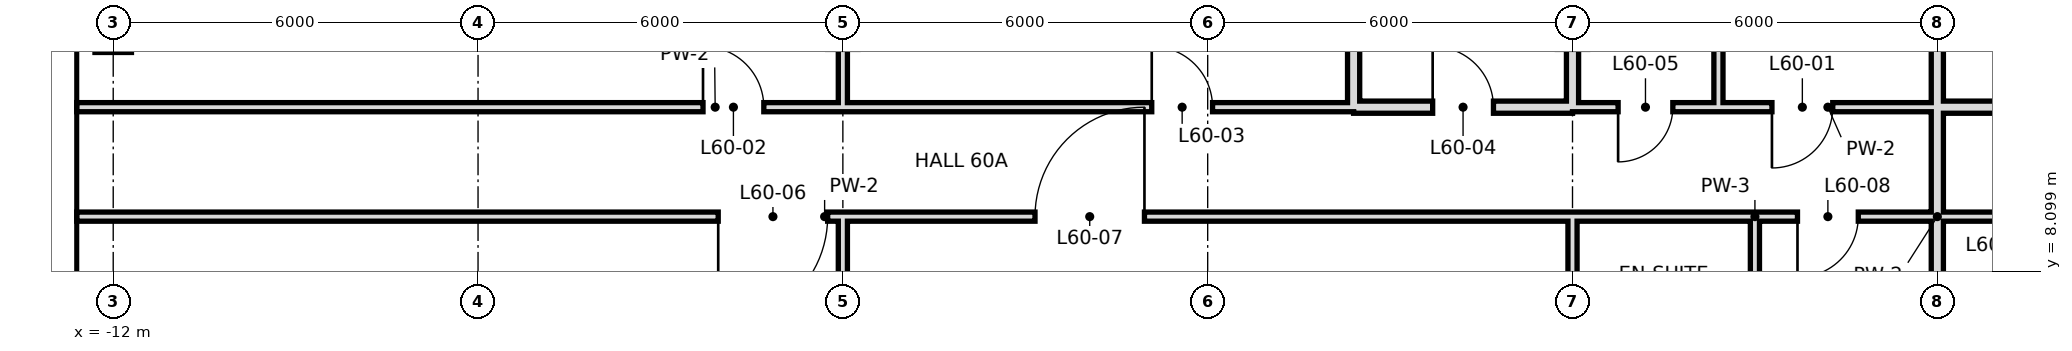
"""IFC4 building model, lengths in metres.
Left out: names, types, materials, properties, quantities, classifications, styles, units other than length and angle.
Written with IfcOpenShell. Run it as: python <this file> out.ifc"""

import sys

from ifc_helpers import new_model, si_unit, direction, frame, frame_2d, origin, place, context, subcontext, project, spatial, rectangle, extrude, element, fill, save


model = new_model("IFC4")
c1 = context("Model", 3, precision=1e-05, world=origin(), true_north=direction((0.0, 1.0)))
c2 = subcontext(c1, "Body", "Model", "MODEL_VIEW")
j1 = project(units=[si_unit("LENGTHUNIT", "METRE"), si_unit("PLANEANGLEUNIT", "RADIAN")], contexts=[c1])
p1 = place(None, origin())
s1 = spatial("IfcSite", under=j1, at=p1, CompositionType="ELEMENT")
p2 = place(p1, origin())
s2 = spatial("IfcBuilding", under=s1, at=p2, CompositionType="ELEMENT")
p3 = place(p2, frame((0.0, 0.0, 254.0)))
s3 = spatial("IfcBuildingStorey", under=s2, at=p3, CompositionType="ELEMENT", Elevation=254.0)
p4 = place(p3, frame((0.0, 0.0, 0.0), z_axis=(0.0, 0.0, 1.0), x_axis=(0.0, 1.0, 0.0)))
e1 = element("IfcWall", 1, at=p4, inside=s3, PredefinedType="PARTITIONING", context=c2, shape_type="SweptSolid", body=[
    extrude(rectangle(XDim=9.0, YDim=0.15, at=frame_2d((4.5, 0.0))), origin(), (0.0, 0.0, 1.0), 2.68),
])
p5 = place(p3, frame((0.0, 10.8, 0.0), z_axis=(0.0, 0.0, 1.0), x_axis=(0.0, 1.0, 0.0)))
e2 = element("IfcWall", 2, at=p5, inside=s3, PredefinedType="PARTITIONING", context=c2, shape_type="SweptSolid", body=[
    extrude(rectangle(XDim=7.2, YDim=0.15, at=frame_2d((3.6, 0.0))), origin(), (0.0, 0.0, 1.0), 2.68),
])
p6 = place(p3, frame((12.0, 10.8, 0.0), z_axis=(0.0, 0.0, 1.0), x_axis=(0.0, 1.0, 0.0)))
e3 = element("IfcWall", 3, at=p6, inside=s3, PredefinedType="SOLIDWALL", context=c2, shape_type="SweptSolid", body=[
    extrude(rectangle(XDim=7.9, YDim=0.2, at=frame_2d((3.95, 0.0))), origin(), (0.0, 0.0, 1.0), 2.68),
])
p7 = place(p3, frame((12.0, 6.0, 0.0), z_axis=(0.0, 0.0, 1.0), x_axis=(0.0, 1.0, 0.0)))
e4 = element("IfcWall", 4, at=p7, inside=s3, PredefinedType="PARTITIONING", context=c2, shape_type="SweptSolid", body=[
    extrude(rectangle(XDim=3.0, YDim=0.15, at=frame_2d((1.5, 0.0))), origin(), (0.0, 0.0, 1.0), 2.68),
])
p8 = place(p3, frame((14.4, 10.8, 0.0), z_axis=(0.0, 0.0, 1.0), x_axis=(0.0, 1.0, 0.0)))
e5 = element("IfcWall", 5, at=p8, inside=s3, PredefinedType="PARTITIONING", context=c2, shape_type="SweptSolid", body=[
    extrude(rectangle(XDim=7.9, YDim=0.15, at=frame_2d((3.95, 0.0))), origin(), (0.0, 0.0, 1.0), 3.38),
])
p9 = place(p3, frame((15.0, 6.0, 0.0), z_axis=(0.0, 0.0, 1.0), x_axis=(0.0, 1.0, 0.0)))
e6 = element("IfcWall", 6, at=p9, inside=s3, PredefinedType="PARTITIONING", context=c2, shape_type="SweptSolid", body=[
    extrude(rectangle(XDim=3.0, YDim=0.15, at=frame_2d((1.5, 0.0))), origin(), (0.0, 0.0, 1.0), 3.38),
])
p10 = place(p3, frame((18.0, 10.8, 0.0), z_axis=(0.0, 0.0, 1.0), x_axis=(0.0, 1.0, 0.0)))
e7 = element("IfcWall", 7, at=p10, inside=s3, PredefinedType="SOLIDWALL", context=c2, shape_type="SweptSolid", body=[
    extrude(rectangle(XDim=7.9, YDim=0.2, at=frame_2d((3.95, 0.0))), origin(), (0.0, 0.0, 1.0), 2.68),
])
p11 = place(p3, frame((18.0, -0.6, 0.0), z_axis=(0.0, 0.0, 1.0), x_axis=(0.0, 1.0, 0.0)))
e8 = element("IfcWall", 8, at=p11, inside=s3, PredefinedType="SOLIDWALL", context=c2, shape_type="SweptSolid", body=[
    extrude(rectangle(XDim=11.4, YDim=0.2, at=frame_2d((5.7, 0.0))), origin(), (0.0, 0.0, 1.0), 2.68),
])
p12 = place(p3, frame((8.4, 10.8, 0.0), z_axis=(0.0, 0.0, 1.0), x_axis=(0.0, 1.0, 0.0)))
e9 = element("IfcWall", 9, at=p12, inside=s3, PredefinedType="SOLIDWALL", context=c2, shape_type="SweptSolid", body=[
    extrude(rectangle(XDim=7.9, YDim=0.2, at=frame_2d((3.95, 0.0))), origin(), (0.0, 0.0, 1.0), 2.68),
])
p13 = place(p3, frame((8.4, 10.8, 0.0), z_axis=(0.0, 0.0, 1.0), x_axis=(1.0, 0.0, 0.0)))
e10 = element("IfcWall", 10, at=p13, inside=s3, PredefinedType="SOLIDWALL", context=c2, shape_type="SweptSolid", body=[
    extrude(rectangle(XDim=3.6, YDim=0.2, at=frame_2d((1.8, 0.0))), origin(), (0.0, 0.0, 1.0), 2.68),
])
p14 = place(p13, frame((1.3, 0.0, 0.0)))
e11 = element("IfcOpeningElement", 11, at=p14, cuts=e10, PredefinedType="OPENING", context=c2, shape_type="SweptSolid", body=[
    extrude(rectangle(XDim=1.0, YDim=2.4, at=frame_2d((0.5, 1.2))), frame((0.0, 0.11, 0.0), z_axis=(0.0, -1.0, 0.0), x_axis=(1.0, 0.0, 0.0)), (0.0, 0.0, 1.0), 0.22),
])
p15 = place(p3, frame((18.0, 10.8, 0.0), z_axis=(0.0, 0.0, 1.0), x_axis=(1.0, 0.0, 0.0)))
e12 = element("IfcWall", 12, at=p15, inside=s3, PredefinedType="SOLIDWALL", context=c2, shape_type="SweptSolid", body=[
    extrude(rectangle(XDim=5.4, YDim=0.2, at=frame_2d((2.7, 0.0))), origin(), (0.0, 0.0, 1.0), 2.68),
])
p16 = place(p15, frame((2.2, 0.0, 0.0)))
e13 = element("IfcOpeningElement", 13, at=p16, cuts=e12, PredefinedType="OPENING", context=c2, shape_type="SweptSolid", body=[
    extrude(rectangle(XDim=1.0, YDim=2.4, at=frame_2d((0.5, 1.2))), frame((0.0, 0.11, 0.0), z_axis=(0.0, -1.0, 0.0), x_axis=(1.0, 0.0, 0.0)), (0.0, 0.0, 1.0), 0.22),
])
p17 = place(p3, frame((-12.6, 10.8, 0.0), z_axis=(0.0, 0.0, 1.0), x_axis=(1.0, 0.0, 0.0)))
e14 = element("IfcWall", 14, at=p17, inside=s3, PredefinedType="PARTITIONING", context=c2, shape_type="SweptSolid", body=[
    extrude(rectangle(XDim=21.0, YDim=0.15, at=frame_2d((10.5, 0.0))), origin(), (0.0, 0.0, 1.0), 3.38),
])
p18 = place(p17, frame((10.3, 0.0, 0.0)))
e15 = element("IfcOpeningElement", 15, at=p18, cuts=e14, PredefinedType="OPENING", context=c2, shape_type="SweptSolid", body=[
    extrude(rectangle(XDim=1.0, YDim=2.4, at=frame_2d((0.5, 1.2))), frame((0.0, 0.085, 0.0), z_axis=(0.0, -1.0, 0.0), x_axis=(1.0, 0.0, 0.0)), (0.0, 0.0, 1.0), 0.17),
])
p19 = place(p17, frame((17.68, 0.0, 0.0)))
e16 = element("IfcOpeningElement", 16, at=p19, cuts=e14, PredefinedType="OPENING", context=c2, shape_type="SweptSolid", body=[
    extrude(rectangle(XDim=1.0, YDim=2.4, at=frame_2d((0.5, 1.2))), frame((0.0, 0.085, 0.0), z_axis=(0.0, -1.0, 0.0), x_axis=(1.0, 0.0, 0.0)), (0.0, 0.0, 1.0), 0.17),
])
p20 = place(p3, frame((14.4, 10.8, 0.0), z_axis=(0.0, 0.0, 1.0), x_axis=(1.0, 0.0, 0.0)))
e17 = element("IfcWall", 17, at=p20, inside=s3, PredefinedType="PARTITIONING", context=c2, shape_type="SweptSolid", body=[
    extrude(rectangle(XDim=3.6, YDim=0.15, at=frame_2d((1.8, 0.0))), origin(), (0.0, 0.0, 1.0), 3.38),
])
p21 = place(p20, frame((0.88, 0.0, 0.0)))
e18 = element("IfcOpeningElement", 18, at=p21, cuts=e17, PredefinedType="OPENING", context=c2, shape_type="SweptSolid", body=[
    extrude(rectangle(XDim=1.0, YDim=2.4, at=frame_2d((0.5, 1.2))), frame((0.0, 0.085, 0.0), z_axis=(0.0, -1.0, 0.0), x_axis=(1.0, 0.0, 0.0)), (0.0, 0.0, 1.0), 0.17),
])
p22 = place(p3, frame((12.0, 10.8, 0.0), z_axis=(0.0, 0.0, 1.0), x_axis=(1.0, 0.0, 0.0)))
e19 = element("IfcWall", 19, at=p22, inside=s3, PredefinedType="PARTITIONING", context=c2, shape_type="SweptSolid", body=[
    extrude(rectangle(XDim=2.4, YDim=0.15, at=frame_2d((1.2, 0.0))), origin(), (0.0, 0.0, 1.0), 3.38),
])
p23 = place(p22, frame((0.75, 0.0, 0.0)))
e20 = element("IfcOpeningElement", 20, at=p23, cuts=e19, PredefinedType="OPENING", context=c2, shape_type="SweptSolid", body=[
    extrude(rectangle(XDim=0.9, YDim=2.4, at=frame_2d((0.45, 1.2))), frame((0.0, 0.085, 0.0), z_axis=(0.0, -1.0, 0.0), x_axis=(1.0, 0.0, 0.0)), (0.0, 0.0, 1.0), 0.17),
])
p24 = place(p3, frame((-12.6, 9.0, 0.0), z_axis=(0.0, 0.0, 1.0), x_axis=(1.0, 0.0, 0.0)))
e21 = element("IfcWall", 21, at=p24, inside=s3, PredefinedType="PARTITIONING", context=c2, shape_type="SweptSolid", body=[
    extrude(rectangle(XDim=24.6, YDim=0.15, at=frame_2d((12.3, 0.0))), origin(), (0.0, 0.0, 1.0), 3.38),
])
p25 = place(p24, frame((10.55, 0.0, 0.0)))
e22 = element("IfcOpeningElement", 22, at=p25, cuts=e21, PredefinedType="OPENING", context=c2, shape_type="SweptSolid", body=[
    extrude(rectangle(XDim=1.8, YDim=2.4, at=frame_2d((0.9, 1.2))), frame((0.0, 0.085, 0.0), z_axis=(0.0, -1.0, 0.0), x_axis=(1.0, 0.0, 0.0)), (0.0, 0.0, 1.0), 0.17),
])
p26 = place(p24, frame((15.76, 0.0, 0.0)))
e23 = element("IfcOpeningElement", 23, at=p26, cuts=e21, PredefinedType="OPENING", context=c2, shape_type="SweptSolid", body=[
    extrude(rectangle(XDim=1.8, YDim=2.4, at=frame_2d((0.9, 1.2))), frame((0.0, 0.085, 0.0), z_axis=(0.0, -1.0, 0.0), x_axis=(1.0, 0.0, 0.0)), (0.0, 0.0, 1.0), 0.17),
])
p27 = place(p3, frame((15.0, 9.0, 0.0), z_axis=(0.0, 0.0, 1.0), x_axis=(1.0, 0.0, 0.0)))
e24 = element("IfcWall", 24, at=p27, inside=s3, PredefinedType="PARTITIONING", context=c2, shape_type="SweptSolid", body=[
    extrude(rectangle(XDim=6.0, YDim=0.15, at=frame_2d((3.0, 0.0))), origin(), (0.0, 0.0, 1.0), 3.38),
])
p28 = place(p27, frame((0.7, 0.0, 0.0)))
e25 = element("IfcOpeningElement", 25, at=p28, cuts=e24, PredefinedType="OPENING", context=c2, shape_type="SweptSolid", body=[
    extrude(rectangle(XDim=1.0, YDim=2.4, at=frame_2d((0.5, 1.2))), frame((0.0, 0.085, 0.0), z_axis=(0.0, -1.0, 0.0), x_axis=(1.0, 0.0, 0.0)), (0.0, 0.0, 1.0), 0.17),
])
p29 = place(p27, frame((4.0, 0.0, 0.0)))
e26 = element("IfcOpeningElement", 26, at=p29, cuts=e24, PredefinedType="OPENING", context=c2, shape_type="SweptSolid", body=[
    extrude(rectangle(XDim=1.0, YDim=2.4, at=frame_2d((0.5, 1.2))), frame((0.0, 0.085, 0.0), z_axis=(0.0, -1.0, 0.0), x_axis=(1.0, 0.0, 0.0)), (0.0, 0.0, 1.0), 0.17),
])
p30 = place(p3, frame((12.0, 9.0, 0.0), z_axis=(0.0, 0.0, 1.0), x_axis=(1.0, 0.0, 0.0)))
e27 = element("IfcWall", 27, at=p30, inside=s3, PredefinedType="PARTITIONING", context=c2, shape_type="SweptSolid", body=[
    extrude(rectangle(XDim=3.0, YDim=0.15, at=frame_2d((1.5, 0.0))), origin(), (0.0, 0.0, 1.0), 3.38),
])
p31 = place(p21, frame((1.0, 0.0, 0.0), z_axis=(0.0, 0.0, 1.0), x_axis=(-1.0, 0.0, 0.0)))
e28 = element("IfcDoor", 28, at=p31, inside=s3, OperationType="SINGLE_SWING_RIGHT", PredefinedType="DOOR", context=c2, shape_type="SweptSolid", body=[
    extrude(rectangle(XDim=1.0, YDim=2.4, at=frame_2d((0.5, 1.2))), frame((0.0, 0.025, 0.0), z_axis=(0.0, -1.0, 0.0), x_axis=(1.0, 0.0, 0.0)), (0.0, 0.0, 1.0), 0.05),
])
fill(e18, e28)
p32 = place(p18, origin())
e29 = element("IfcDoor", 29, at=p32, inside=s3, OperationType="SINGLE_SWING_LEFT", PredefinedType="DOOR", context=c2, shape_type="SweptSolid", body=[
    extrude(rectangle(XDim=1.0, YDim=2.4, at=frame_2d((0.5, 1.2))), frame((0.0, 0.025, 0.0), z_axis=(0.0, -1.0, 0.0), x_axis=(1.0, 0.0, 0.0)), (0.0, 0.0, 1.0), 0.05),
])
fill(e15, e29)
p33 = place(p19, origin())
e30 = element("IfcDoor", 30, at=p33, inside=s3, OperationType="SINGLE_SWING_LEFT", PredefinedType="DOOR", context=c2, shape_type="SweptSolid", body=[
    extrude(rectangle(XDim=1.0, YDim=2.4, at=frame_2d((0.5, 1.2))), frame((0.0, 0.025, 0.0), z_axis=(0.0, -1.0, 0.0), x_axis=(1.0, 0.0, 0.0)), (0.0, 0.0, 1.0), 0.05),
])
fill(e16, e30)
p34 = place(p14, origin())
e31 = element("IfcDoor", 31, at=p34, inside=s3, OperationType="SINGLE_SWING_LEFT", PredefinedType="DOOR", context=c2, shape_type="SweptSolid", body=[
    extrude(rectangle(XDim=1.0, YDim=2.4, at=frame_2d((0.5, 1.2))), frame((0.0, 0.025, 0.0), z_axis=(0.0, -1.0, 0.0), x_axis=(1.0, 0.0, 0.0)), (0.0, 0.0, 1.0), 0.05),
])
fill(e11, e31)
p35 = place(p23, frame((0.9, 0.0, 0.0), z_axis=(0.0, 0.0, 1.0), x_axis=(-1.0, 0.0, 0.0)))
e32 = element("IfcDoor", 32, at=p35, inside=s3, OperationType="SINGLE_SWING_RIGHT", PredefinedType="DOOR", context=c2, shape_type="SweptSolid", body=[
    extrude(rectangle(XDim=0.9, YDim=2.4, at=frame_2d((0.45, 1.2))), frame((0.0, 0.025, 0.0), z_axis=(0.0, -1.0, 0.0), x_axis=(1.0, 0.0, 0.0)), (0.0, 0.0, 1.0), 0.05),
])
fill(e20, e32)
p36 = place(p25, frame((1.8, 0.0, 0.0), z_axis=(0.0, 0.0, 1.0), x_axis=(-1.0, 0.0, 0.0)))
e33 = element("IfcDoor", 33, at=p36, inside=s3, OperationType="SINGLE_SWING_RIGHT", PredefinedType="DOOR", context=c2, shape_type="SweptSolid", body=[
    extrude(rectangle(XDim=1.8, YDim=2.4, at=frame_2d((0.9, 1.2))), frame((0.0, 0.025, 0.0), z_axis=(0.0, -1.0, 0.0), x_axis=(1.0, 0.0, 0.0)), (0.0, 0.0, 1.0), 0.05),
])
fill(e22, e33)
p37 = place(p26, frame((1.8, 0.0, 0.0), z_axis=(0.0, 0.0, 1.0), x_axis=(-1.0, 0.0, 0.0)))
e34 = element("IfcDoor", 34, at=p37, inside=s3, OperationType="SINGLE_SWING_LEFT", PredefinedType="DOOR", context=c2, shape_type="SweptSolid", body=[
    extrude(rectangle(XDim=1.8, YDim=2.4, at=frame_2d((0.9, 1.2))), frame((0.0, 0.025, 0.0), z_axis=(0.0, -1.0, 0.0), x_axis=(1.0, 0.0, 0.0)), (0.0, 0.0, 1.0), 0.05),
])
fill(e23, e34)
p38 = place(p28, frame((1.0, 0.0, 0.0), z_axis=(0.0, 0.0, 1.0), x_axis=(-1.0, 0.0, 0.0)))
e35 = element("IfcDoor", 35, at=p38, inside=s3, OperationType="SINGLE_SWING_RIGHT", PredefinedType="DOOR", context=c2, shape_type="SweptSolid", body=[
    extrude(rectangle(XDim=1.0, YDim=2.4, at=frame_2d((0.5, 1.2))), frame((0.0, 0.025, 0.0), z_axis=(0.0, -1.0, 0.0), x_axis=(1.0, 0.0, 0.0)), (0.0, 0.0, 1.0), 0.05),
])
fill(e25, e35)
save(model, sys.argv[1])
